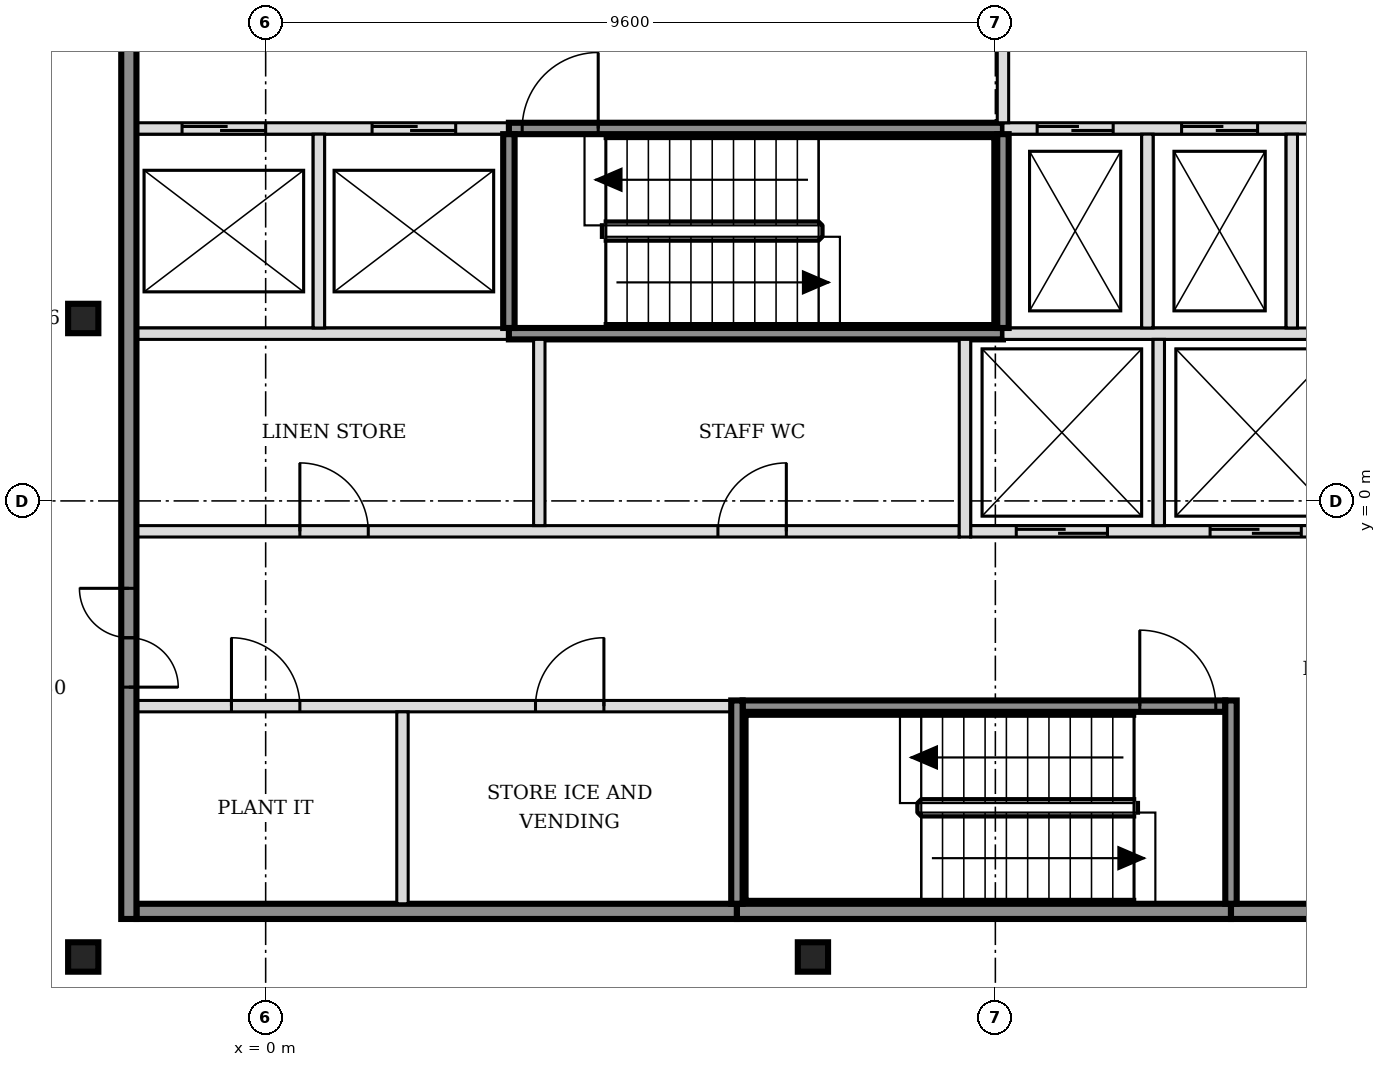
"""IFC4 building model, lengths in metres.
Left out: names, types, materials, properties, quantities, classifications, styles, units other than length and angle.
Written with IfcOpenShell. Run it as: python <this file> out.ifc"""

import sys

from ifc_helpers import new_model, si_unit, direction, frame, frame_2d, origin, origin_2d, place, context, subcontext, project, spatial, rectangle, i_section, extrude, element, fill, save


model = new_model("IFC4")
c1 = context("Model", 3, precision=1e-05, world=origin(), true_north=direction((0.0, 1.0)))
c2 = subcontext(c1, "Body", "Model", "MODEL_VIEW")
j1 = project(units=[si_unit("LENGTHUNIT", "METRE"), si_unit("PLANEANGLEUNIT", "RADIAN")], contexts=[c1])
p1 = place(None, origin())
s1 = spatial("IfcSite", under=j1, at=p1, CompositionType="ELEMENT")
p2 = place(p1, origin())
s2 = spatial("IfcBuilding", under=s1, at=p2, CompositionType="ELEMENT")
p3 = place(p2, frame((0.0, 0.0, 239.4)))
s3 = spatial("IfcBuildingStorey", under=s2, at=p3, CompositionType="ELEMENT", Elevation=239.4)
for number, where, z_axis, x_axis in (
    (1, (-2.4, -6.0, -0.15), (0.0, 0.0, 1.0), (1.0, 0.0, 0.0)),
    (2, (7.2, -6.0, -0.15), (0.0, 0.0, 1.0), (1.0, 0.0, 0.0)),
    (3, (-2.4, 2.4, -0.15), (0.0, 0.0, 1.0), (1.0, 0.0, 0.0)),
):
    element("IfcColumn", number, at=place(p3, frame(where, z_axis=z_axis, x_axis=x_axis)), inside=s3, PredefinedType="COLUMN", context=c2, shape_type="SweptSolid", body=[
        extrude(i_section(OverallWidth=0.398, OverallDepth=0.387, WebThickness=0.021, FlangeThickness=0.033, FilletRadius=0.015, at=origin_2d()), origin(), (0.0, 0.0, 1.0), 3.6),
    ])
p4 = place(p3, frame((-1.7, -5.4, 0.0), z_axis=(0.0, 0.0, 1.0), x_axis=(1.0, 0.0, 0.0)))
e4 = element("IfcWall", 4, at=p4, inside=s3, PredefinedType="SOLIDWALL", context=c2, shape_type="SweptSolid", body=[
    extrude(rectangle(XDim=7.9, YDim=0.2, at=frame_2d((3.95, 0.0))), origin(), (0.0, 0.0, 1.0), 3.45),
])
p5 = place(p3, frame((6.2, -5.4, 0.0), z_axis=(0.0, 0.0, 1.0), x_axis=(1.0, 0.0, 0.0)))
e5 = element("IfcWall", 5, at=p5, inside=s3, PredefinedType="SOLIDWALL", context=c2, shape_type="SweptSolid", body=[
    extrude(rectangle(XDim=6.5, YDim=0.2, at=frame_2d((3.25, 0.0))), origin(), (0.0, 0.0, 1.0), 3.45),
])
p6 = place(p3, frame((12.7, -5.4, 0.0), z_axis=(0.0, 0.0, 1.0), x_axis=(1.0, 0.0, 0.0)))
e6 = element("IfcWall", 6, at=p6, inside=s3, PredefinedType="SOLIDWALL", context=c2, shape_type="SweptSolid", body=[
    extrude(rectangle(XDim=3.4, YDim=0.2, at=frame_2d((1.7, 0.0))), origin(), (0.0, 0.0, 1.0), 3.45),
])
p7 = place(p3, frame((-1.7, -2.7, 0.0), z_axis=(0.0, 0.0, 1.0), x_axis=(1.0, 0.0, 0.0)))
e7 = element("IfcWall", 7, at=p7, inside=s3, PredefinedType="PARTITIONING", context=c2, shape_type="SweptSolid", body=[
    extrude(rectangle(XDim=7.825, YDim=0.15, at=frame_2d((3.913, 0.0))), origin(), (0.0, 0.0, 1.0), 3.45),
])
p8 = place(p7, frame((1.25, 0.0, 0.0)))
e8 = element("IfcOpeningElement", 8, at=p8, cuts=e7, PredefinedType="OPENING", context=c2, shape_type="SweptSolid", body=[
    extrude(rectangle(XDim=0.9, YDim=2.1, at=frame_2d((0.45, 1.05))), frame((0.0, 0.085, 0.0), z_axis=(0.0, -1.0, 0.0), x_axis=(1.0, 0.0, 0.0)), (0.0, 0.0, 1.0), 0.17),
])
p9 = place(p7, frame((5.25, 0.0, 0.0)))
e9 = element("IfcOpeningElement", 9, at=p9, cuts=e7, PredefinedType="OPENING", context=c2, shape_type="SweptSolid", body=[
    extrude(rectangle(XDim=0.9, YDim=2.1, at=frame_2d((0.45, 1.05))), frame((0.0, 0.085, 0.0), z_axis=(0.0, -1.0, 0.0), x_axis=(1.0, 0.0, 0.0)), (0.0, 0.0, 1.0), 0.17),
])
p10 = place(p3, frame((6.275, -2.7, 0.0), z_axis=(0.0, 0.0, 1.0), x_axis=(1.0, 0.0, 0.0)))
e10 = element("IfcWall", 10, at=p10, inside=s3, PredefinedType="SOLIDWALL", context=c2, shape_type="SweptSolid", body=[
    extrude(rectangle(XDim=6.35, YDim=0.15, at=frame_2d((3.175, 0.0))), origin(), (0.0, 0.0, 1.0), 3.45),
])
p11 = place(p10, frame((5.225, 0.0, 0.0)))
e11 = element("IfcOpeningElement", 11, at=p11, cuts=e10, PredefinedType="OPENING", context=c2, shape_type="SweptSolid", body=[
    extrude(rectangle(XDim=1.0, YDim=2.1, at=frame_2d((0.5, 1.05))), frame((0.0, 0.085, 0.0), z_axis=(0.0, -1.0, 0.0), x_axis=(1.0, 0.0, 0.0)), (0.0, 0.0, 1.0), 0.17),
])
p12 = place(p3, frame((-1.7, -0.4, 0.0), z_axis=(0.0, 0.0, 1.0), x_axis=(1.0, 0.0, 0.0)))
e12 = element("IfcWall", 12, at=p12, inside=s3, PredefinedType="PARTITIONING", context=c2, shape_type="SweptSolid", body=[
    extrude(rectangle(XDim=10.825, YDim=0.15, at=frame_2d((5.413, 0.0))), origin(), (0.0, 0.0, 1.0), 3.45),
])
p13 = place(p12, frame((2.15, 0.0, 0.0)))
e13 = element("IfcOpeningElement", 13, at=p13, cuts=e12, PredefinedType="OPENING", context=c2, shape_type="SweptSolid", body=[
    extrude(rectangle(XDim=0.9, YDim=2.1, at=frame_2d((0.45, 1.05))), frame((0.0, 0.085, 0.0), z_axis=(0.0, -1.0, 0.0), x_axis=(1.0, 0.0, 0.0)), (0.0, 0.0, 1.0), 0.17),
])
p14 = place(p12, frame((7.65, 0.0, 0.0)))
e14 = element("IfcOpeningElement", 14, at=p14, cuts=e12, PredefinedType="OPENING", context=c2, shape_type="SweptSolid", body=[
    extrude(rectangle(XDim=0.9, YDim=2.1, at=frame_2d((0.45, 1.05))), frame((0.0, 0.085, 0.0), z_axis=(0.0, -1.0, 0.0), x_axis=(1.0, 0.0, 0.0)), (0.0, 0.0, 1.0), 0.17),
])
p15 = place(p3, frame((9.275, -0.4, 0.0), z_axis=(0.0, 0.0, 1.0), x_axis=(1.0, 0.0, 0.0)))
e15 = element("IfcWall", 15, at=p15, inside=s3, PredefinedType="SOLIDWALL", context=c2, shape_type="SweptSolid", body=[
    extrude(rectangle(XDim=4.95, YDim=0.15, at=frame_2d((2.475, 0.0))), origin(), (0.0, 0.0, 1.0), 3.45),
])
p16 = place(p15, frame((0.6, 0.0, 0.0)))
e16 = element("IfcOpeningElement", 16, at=p16, cuts=e15, PredefinedType="OPENING", context=c2, shape_type="SweptSolid", body=[
    extrude(rectangle(XDim=1.2, YDim=2.1, at=frame_2d((0.6, 1.05))), frame((0.0, 0.085, 0.0), z_axis=(0.0, -1.0, 0.0), x_axis=(1.0, 0.0, 0.0)), (0.0, 0.0, 1.0), 0.17),
])
p17 = place(p15, frame((3.15, 0.0, 0.0)))
e17 = element("IfcOpeningElement", 17, at=p17, cuts=e15, PredefinedType="OPENING", context=c2, shape_type="SweptSolid", body=[
    extrude(rectangle(XDim=1.2, YDim=2.1, at=frame_2d((0.6, 1.05))), frame((0.0, 0.085, 0.0), z_axis=(0.0, -1.0, 0.0), x_axis=(1.0, 0.0, 0.0)), (0.0, 0.0, 1.0), 0.17),
])
p18 = place(p3, frame((-1.7, 2.2, 0.0), z_axis=(0.0, 0.0, 1.0), x_axis=(1.0, 0.0, 0.0)))
e18 = element("IfcWall", 18, at=p18, inside=s3, PredefinedType="SOLIDWALL", context=c2, shape_type="SweptSolid", body=[
    extrude(rectangle(XDim=4.9, YDim=0.15, at=frame_2d((2.45, 0.0))), origin(), (0.0, 0.0, 1.0), 3.45),
])
p19 = place(p3, frame((3.2, 2.2, 0.0), z_axis=(0.0, 0.0, 1.0), x_axis=(1.0, 0.0, 0.0)))
e19 = element("IfcWall", 19, at=p19, inside=s3, PredefinedType="SOLIDWALL", context=c2, shape_type="SweptSolid", body=[
    extrude(rectangle(XDim=6.5, YDim=0.15, at=frame_2d((3.25, 0.0))), origin(), (0.0, 0.0, 1.0), 3.45),
])
p20 = place(p3, frame((9.7, 2.2, 0.0), z_axis=(0.0, 0.0, 1.0), x_axis=(1.0, 0.0, 0.0)))
e20 = element("IfcWall", 20, at=p20, inside=s3, PredefinedType="SOLIDWALL", context=c2, shape_type="SweptSolid", body=[
    extrude(rectangle(XDim=4.525, YDim=0.15, at=frame_2d((2.263, 0.0))), origin(), (0.0, 0.0, 1.0), 3.45),
])
p21 = place(p3, frame((-1.7, 4.9, 0.0), z_axis=(0.0, 0.0, 1.0), x_axis=(1.0, 0.0, 0.0)))
e21 = element("IfcWall", 21, at=p21, inside=s3, PredefinedType="SOLIDWALL", context=c2, shape_type="SweptSolid", body=[
    extrude(rectangle(XDim=4.9, YDim=0.15, at=frame_2d((2.45, 0.0))), origin(), (0.0, 0.0, 1.0), 3.45),
])
p22 = place(p21, frame((0.6, 0.0, 0.0)))
e22 = element("IfcOpeningElement", 22, at=p22, cuts=e21, PredefinedType="OPENING", context=c2, shape_type="SweptSolid", body=[
    extrude(rectangle(XDim=1.1, YDim=2.1, at=frame_2d((0.55, 1.05))), frame((0.0, 0.085, 0.0), z_axis=(0.0, -1.0, 0.0), x_axis=(1.0, 0.0, 0.0)), (0.0, 0.0, 1.0), 0.17),
])
p23 = place(p21, frame((3.1, 0.0, 0.0)))
e23 = element("IfcOpeningElement", 23, at=p23, cuts=e21, PredefinedType="OPENING", context=c2, shape_type="SweptSolid", body=[
    extrude(rectangle(XDim=1.1, YDim=2.1, at=frame_2d((0.55, 1.05))), frame((0.0, 0.085, 0.0), z_axis=(0.0, -1.0, 0.0), x_axis=(1.0, 0.0, 0.0)), (0.0, 0.0, 1.0), 0.17),
])
p24 = place(p3, frame((3.2, 4.9, 0.0), z_axis=(0.0, 0.0, 1.0), x_axis=(1.0, 0.0, 0.0)))
e24 = element("IfcWall", 24, at=p24, inside=s3, PredefinedType="SOLIDWALL", context=c2, shape_type="SweptSolid", body=[
    extrude(rectangle(XDim=6.5, YDim=0.15, at=frame_2d((3.25, 0.0))), origin(), (0.0, 0.0, 1.0), 3.45),
])
p25 = place(p24, frame((0.175, 0.0, 0.0)))
e25 = element("IfcOpeningElement", 25, at=p25, cuts=e24, PredefinedType="OPENING", context=c2, shape_type="SweptSolid", body=[
    extrude(rectangle(XDim=1.0, YDim=2.1, at=frame_2d((0.5, 1.05))), frame((0.0, 0.085, 0.0), z_axis=(0.0, -1.0, 0.0), x_axis=(1.0, 0.0, 0.0)), (0.0, 0.0, 1.0), 0.17),
])
p26 = place(p3, frame((9.7, 4.9, 0.0), z_axis=(0.0, 0.0, 1.0), x_axis=(1.0, 0.0, 0.0)))
e26 = element("IfcWall", 26, at=p26, inside=s3, PredefinedType="SOLIDWALL", context=c2, shape_type="SweptSolid", body=[
    extrude(rectangle(XDim=6.4, YDim=0.15, at=frame_2d((3.2, 0.0))), origin(), (0.0, 0.0, 1.0), 3.45),
])
p27 = place(p26, frame((0.45, 0.0, 0.0)))
e27 = element("IfcOpeningElement", 27, at=p27, cuts=e26, PredefinedType="OPENING", context=c2, shape_type="SweptSolid", body=[
    extrude(rectangle(XDim=1.0, YDim=2.1, at=frame_2d((0.5, 1.05))), frame((0.0, 0.085, 0.0), z_axis=(0.0, -1.0, 0.0), x_axis=(1.0, 0.0, 0.0)), (0.0, 0.0, 1.0), 0.17),
])
p28 = place(p26, frame((2.35, 0.0, 0.0)))
e28 = element("IfcOpeningElement", 28, at=p28, cuts=e26, PredefinedType="OPENING", context=c2, shape_type="SweptSolid", body=[
    extrude(rectangle(XDim=1.0, YDim=2.1, at=frame_2d((0.5, 1.05))), frame((0.0, 0.085, 0.0), z_axis=(0.0, -1.0, 0.0), x_axis=(1.0, 0.0, 0.0)), (0.0, 0.0, 1.0), 0.17),
])
p29 = place(p26, frame((4.7, 0.0, 0.0)))
e29 = element("IfcOpeningElement", 29, at=p29, cuts=e26, PredefinedType="OPENING", context=c2, shape_type="SweptSolid", body=[
    extrude(rectangle(XDim=0.9, YDim=2.1, at=frame_2d((0.45, 1.05))), frame((0.0, 0.085, 0.0), z_axis=(0.0, -1.0, 0.0), x_axis=(1.0, 0.0, 0.0)), (0.0, 0.0, 1.0), 0.17),
])
p30 = place(p3, frame((-1.8, -5.5, 0.0), z_axis=(0.0, 0.0, 1.0), x_axis=(0.0, 1.0, 0.0)))
e30 = element("IfcWall", 30, at=p30, inside=s3, PredefinedType="SOLIDWALL", context=c2, shape_type="SweptSolid", body=[
    extrude(rectangle(XDim=15.8, YDim=0.2, at=frame_2d((7.9, 0.0))), origin(), (0.0, 0.0, 1.0), 3.45),
])
p31 = place(p30, frame((3.05, 0.0, 0.0)))
e31 = element("IfcOpeningElement", 31, at=p31, cuts=e30, PredefinedType="OPENING", context=c2, shape_type="SweptSolid", body=[
    extrude(rectangle(XDim=1.3, YDim=2.1, at=frame_2d((0.65, 1.05))), frame((0.0, 0.11, 0.0), z_axis=(0.0, -1.0, 0.0), x_axis=(1.0, 0.0, 0.0)), (0.0, 0.0, 1.0), 0.22),
])
p32 = place(p30, frame((11.45, 0.0, 0.0)))
e32 = element("IfcOpeningElement", 32, at=p32, cuts=e30, PredefinedType="OPENING", context=c2, shape_type="SweptSolid", body=[
    extrude(rectangle(XDim=1.3, YDim=2.1, at=frame_2d((0.65, 1.05))), frame((0.0, 0.11, 0.0), z_axis=(0.0, -1.0, 0.0), x_axis=(1.0, 0.0, 0.0)), (0.0, 0.0, 1.0), 0.22),
])
p33 = place(p3, frame((0.7, 2.275, 0.0), z_axis=(0.0, 0.0, 1.0), x_axis=(0.0, 1.0, 0.0)))
e33 = element("IfcWall", 33, at=p33, inside=s3, PredefinedType="SOLIDWALL", context=c2, shape_type="SweptSolid", body=[
    extrude(rectangle(XDim=2.55, YDim=0.15, at=frame_2d((1.275, 0.0))), origin(), (0.0, 0.0, 1.0), 3.45),
])
p34 = place(p3, frame((1.8, -5.3, 0.0), z_axis=(0.0, 0.0, 1.0), x_axis=(0.0, 1.0, 0.0)))
e34 = element("IfcWall", 34, at=p34, inside=s3, PredefinedType="PARTITIONING", context=c2, shape_type="SweptSolid", body=[
    extrude(rectangle(XDim=2.525, YDim=0.15, at=frame_2d((1.263, 0.0))), origin(), (0.0, 0.0, 1.0), 3.45),
])
p35 = place(p3, frame((3.2, 2.275, 0.0), z_axis=(0.0, 0.0, 1.0), x_axis=(0.0, 1.0, 0.0)))
e35 = element("IfcWall", 35, at=p35, inside=s3, PredefinedType="SOLIDWALL", context=c2, shape_type="SweptSolid", body=[
    extrude(rectangle(XDim=2.55, YDim=0.15, at=frame_2d((1.275, 0.0))), origin(), (0.0, 0.0, 1.0), 3.45),
])
p36 = place(p3, frame((3.6, -0.325, 0.0), z_axis=(0.0, 0.0, 1.0), x_axis=(0.0, 1.0, 0.0)))
e36 = element("IfcWall", 36, at=p36, inside=s3, PredefinedType="PARTITIONING", context=c2, shape_type="SweptSolid", body=[
    extrude(rectangle(XDim=2.45, YDim=0.15, at=frame_2d((1.225, 0.0))), origin(), (0.0, 0.0, 1.0), 3.45),
])
p37 = place(p3, frame((6.2, -5.3, 0.0), z_axis=(0.0, 0.0, 1.0), x_axis=(0.0, 1.0, 0.0)))
e37 = element("IfcWall", 37, at=p37, inside=s3, PredefinedType="SOLIDWALL", context=c2, shape_type="SweptSolid", body=[
    extrude(rectangle(XDim=2.675, YDim=0.15, at=frame_2d((1.337, 0.0))), origin(), (0.0, 0.0, 1.0), 3.45),
])
p38 = place(p3, frame((9.2, -0.475, 0.0), z_axis=(0.0, 0.0, 1.0), x_axis=(0.0, 1.0, 0.0)))
e38 = element("IfcWall", 38, at=p38, inside=s3, PredefinedType="SOLIDWALL", context=c2, shape_type="SweptSolid", body=[
    extrude(rectangle(XDim=2.6, YDim=0.15, at=frame_2d((1.3, 0.0))), origin(), (0.0, 0.0, 1.0), 3.45),
])
p39 = place(p3, frame((9.7, 2.275, 0.0), z_axis=(0.0, 0.0, 1.0), x_axis=(0.0, 1.0, 0.0)))
e39 = element("IfcWall", 39, at=p39, inside=s3, PredefinedType="SOLIDWALL", context=c2, shape_type="SweptSolid", body=[
    extrude(rectangle(XDim=2.55, YDim=0.15, at=frame_2d((1.275, 0.0))), origin(), (0.0, 0.0, 1.0), 3.45),
])
p40 = place(p3, frame((9.7, 4.975, 0.0), z_axis=(0.0, 0.0, 1.0), x_axis=(0.0, 1.0, 0.0)))
e40 = element("IfcWall", 40, at=p40, inside=s3, PredefinedType="SOLIDWALL", context=c2, shape_type="SweptSolid", body=[
    extrude(rectangle(XDim=2.45, YDim=0.15, at=frame_2d((1.225, 0.0))), origin(), (0.0, 0.0, 1.0), 3.45),
])
p41 = place(p3, frame((11.6, 2.275, 0.0), z_axis=(0.0, 0.0, 1.0), x_axis=(0.0, 1.0, 0.0)))
e41 = element("IfcWall", 41, at=p41, inside=s3, PredefinedType="SOLIDWALL", context=c2, shape_type="SweptSolid", body=[
    extrude(rectangle(XDim=2.55, YDim=0.15, at=frame_2d((1.275, 0.0))), origin(), (0.0, 0.0, 1.0), 3.45),
])
p42 = place(p3, frame((11.75, -0.325, 0.0), z_axis=(0.0, 0.0, 1.0), x_axis=(0.0, 1.0, 0.0)))
e42 = element("IfcWall", 42, at=p42, inside=s3, PredefinedType="SOLIDWALL", context=c2, shape_type="SweptSolid", body=[
    extrude(rectangle(XDim=2.45, YDim=0.15, at=frame_2d((1.225, 0.0))), origin(), (0.0, 0.0, 1.0), 3.45),
])
p43 = place(p3, frame((12.7, -5.3, 0.0), z_axis=(0.0, 0.0, 1.0), x_axis=(0.0, 1.0, 0.0)))
e43 = element("IfcWall", 43, at=p43, inside=s3, PredefinedType="SOLIDWALL", context=c2, shape_type="SweptSolid", body=[
    extrude(rectangle(XDim=2.675, YDim=0.15, at=frame_2d((1.337, 0.0))), origin(), (0.0, 0.0, 1.0), 3.45),
])
p44 = place(p3, frame((13.5, 2.275, 0.0), z_axis=(0.0, 0.0, 1.0), x_axis=(0.0, 1.0, 0.0)))
e44 = element("IfcWall", 44, at=p44, inside=s3, PredefinedType="SOLIDWALL", context=c2, shape_type="SweptSolid", body=[
    extrude(rectangle(XDim=2.55, YDim=0.15, at=frame_2d((1.275, 0.0))), origin(), (0.0, 0.0, 1.0), 3.45),
])
p45 = place(p16, origin())
e45 = element("IfcDoor", 45, at=p45, inside=s3, OperationType="DOUBLE_DOOR_SLIDING", PredefinedType="DOOR", context=c2, shape_type="SweptSolid", body=[
    extrude(rectangle(XDim=1.2, YDim=2.1, at=frame_2d((0.6, 1.05))), frame((0.0, 0.025, 0.0), z_axis=(0.0, -1.0, 0.0), x_axis=(1.0, 0.0, 0.0)), (0.0, 0.0, 1.0), 0.05),
])
fill(e16, e45)
p46 = place(p17, origin())
e46 = element("IfcDoor", 46, at=p46, inside=s3, OperationType="DOUBLE_DOOR_SLIDING", PredefinedType="DOOR", context=c2, shape_type="SweptSolid", body=[
    extrude(rectangle(XDim=1.2, YDim=2.1, at=frame_2d((0.6, 1.05))), frame((0.0, 0.025, 0.0), z_axis=(0.0, -1.0, 0.0), x_axis=(1.0, 0.0, 0.0)), (0.0, 0.0, 1.0), 0.05),
])
fill(e17, e46)
p47 = place(p22, origin())
e47 = element("IfcDoor", 47, at=p47, inside=s3, OperationType="DOUBLE_DOOR_SLIDING", PredefinedType="DOOR", context=c2, shape_type="SweptSolid", body=[
    extrude(rectangle(XDim=1.1, YDim=2.1, at=frame_2d((0.55, 1.05))), frame((0.0, 0.025, 0.0), z_axis=(0.0, -1.0, 0.0), x_axis=(1.0, 0.0, 0.0)), (0.0, 0.0, 1.0), 0.05),
])
fill(e22, e47)
p48 = place(p23, origin())
e48 = element("IfcDoor", 48, at=p48, inside=s3, OperationType="DOUBLE_DOOR_SLIDING", PredefinedType="DOOR", context=c2, shape_type="SweptSolid", body=[
    extrude(rectangle(XDim=1.1, YDim=2.1, at=frame_2d((0.55, 1.05))), frame((0.0, 0.025, 0.0), z_axis=(0.0, -1.0, 0.0), x_axis=(1.0, 0.0, 0.0)), (0.0, 0.0, 1.0), 0.05),
])
fill(e23, e48)
p49 = place(p27, origin())
e49 = element("IfcDoor", 49, at=p49, inside=s3, OperationType="DOUBLE_DOOR_SLIDING", PredefinedType="DOOR", context=c2, shape_type="SweptSolid", body=[
    extrude(rectangle(XDim=1.0, YDim=2.1, at=frame_2d((0.5, 1.05))), frame((0.0, 0.025, 0.0), z_axis=(0.0, -1.0, 0.0), x_axis=(1.0, 0.0, 0.0)), (0.0, 0.0, 1.0), 0.05),
])
fill(e27, e49)
p50 = place(p28, origin())
e50 = element("IfcDoor", 50, at=p50, inside=s3, OperationType="DOUBLE_DOOR_SLIDING", PredefinedType="DOOR", context=c2, shape_type="SweptSolid", body=[
    extrude(rectangle(XDim=1.0, YDim=2.1, at=frame_2d((0.5, 1.05))), frame((0.0, 0.025, 0.0), z_axis=(0.0, -1.0, 0.0), x_axis=(1.0, 0.0, 0.0)), (0.0, 0.0, 1.0), 0.05),
])
fill(e28, e50)
p51 = place(p11, origin())
e51 = element("IfcDoor", 51, at=p51, inside=s3, OperationType="SINGLE_SWING_LEFT", PredefinedType="DOOR", context=c2, shape_type="SweptSolid", body=[
    extrude(rectangle(XDim=1.0, YDim=2.1, at=frame_2d((0.5, 1.05))), frame((0.0, 0.025, 0.0), z_axis=(0.0, -1.0, 0.0), x_axis=(1.0, 0.0, 0.0)), (0.0, 0.0, 1.0), 0.05),
])
fill(e11, e51)
p52 = place(p25, origin())
e52 = element("IfcDoor", 52, at=p52, inside=s3, OperationType="SINGLE_SWING_RIGHT", PredefinedType="DOOR", context=c2, shape_type="SweptSolid", body=[
    extrude(rectangle(XDim=1.0, YDim=2.1, at=frame_2d((0.5, 1.05))), frame((0.0, 0.025, 0.0), z_axis=(0.0, -1.0, 0.0), x_axis=(1.0, 0.0, 0.0)), (0.0, 0.0, 1.0), 0.05),
])
fill(e25, e52)
p53 = place(p31, origin())
e53 = element("IfcDoor", 53, at=p53, inside=s3, OperationType="DOUBLE_DOOR_SINGLE_SWING", PredefinedType="DOOR", context=c2, shape_type="SweptSolid", body=[
    extrude(rectangle(XDim=1.3, YDim=2.1, at=frame_2d((0.65, 1.05))), frame((0.0, 0.025, 0.0), z_axis=(0.0, -1.0, 0.0), x_axis=(1.0, 0.0, 0.0)), (0.0, 0.0, 1.0), 0.05),
])
fill(e31, e53)
p54 = place(p8, origin())
e54 = element("IfcDoor", 54, at=p54, inside=s3, OperationType="SINGLE_SWING_LEFT", PredefinedType="DOOR", context=c2, shape_type="SweptSolid", body=[
    extrude(rectangle(XDim=0.9, YDim=2.1, at=frame_2d((0.45, 1.05))), frame((0.0, 0.025, 0.0), z_axis=(0.0, -1.0, 0.0), x_axis=(1.0, 0.0, 0.0)), (0.0, 0.0, 1.0), 0.05),
])
fill(e8, e54)
p55 = place(p9, origin())
e55 = element("IfcDoor", 55, at=p55, inside=s3, OperationType="SINGLE_SWING_RIGHT", PredefinedType="DOOR", context=c2, shape_type="SweptSolid", body=[
    extrude(rectangle(XDim=0.9, YDim=2.1, at=frame_2d((0.45, 1.05))), frame((0.0, 0.025, 0.0), z_axis=(0.0, -1.0, 0.0), x_axis=(1.0, 0.0, 0.0)), (0.0, 0.0, 1.0), 0.05),
])
fill(e9, e55)
p56 = place(p13, origin())
e56 = element("IfcDoor", 56, at=p56, inside=s3, OperationType="SINGLE_SWING_LEFT", PredefinedType="DOOR", context=c2, shape_type="SweptSolid", body=[
    extrude(rectangle(XDim=0.9, YDim=2.1, at=frame_2d((0.45, 1.05))), frame((0.0, 0.025, 0.0), z_axis=(0.0, -1.0, 0.0), x_axis=(1.0, 0.0, 0.0)), (0.0, 0.0, 1.0), 0.05),
])
fill(e13, e56)
p57 = place(p14, origin())
e57 = element("IfcDoor", 57, at=p57, inside=s3, OperationType="SINGLE_SWING_RIGHT", PredefinedType="DOOR", context=c2, shape_type="SweptSolid", body=[
    extrude(rectangle(XDim=0.9, YDim=2.1, at=frame_2d((0.45, 1.05))), frame((0.0, 0.025, 0.0), z_axis=(0.0, -1.0, 0.0), x_axis=(1.0, 0.0, 0.0)), (0.0, 0.0, 1.0), 0.05),
])
fill(e14, e57)
save(model, sys.argv[1])
